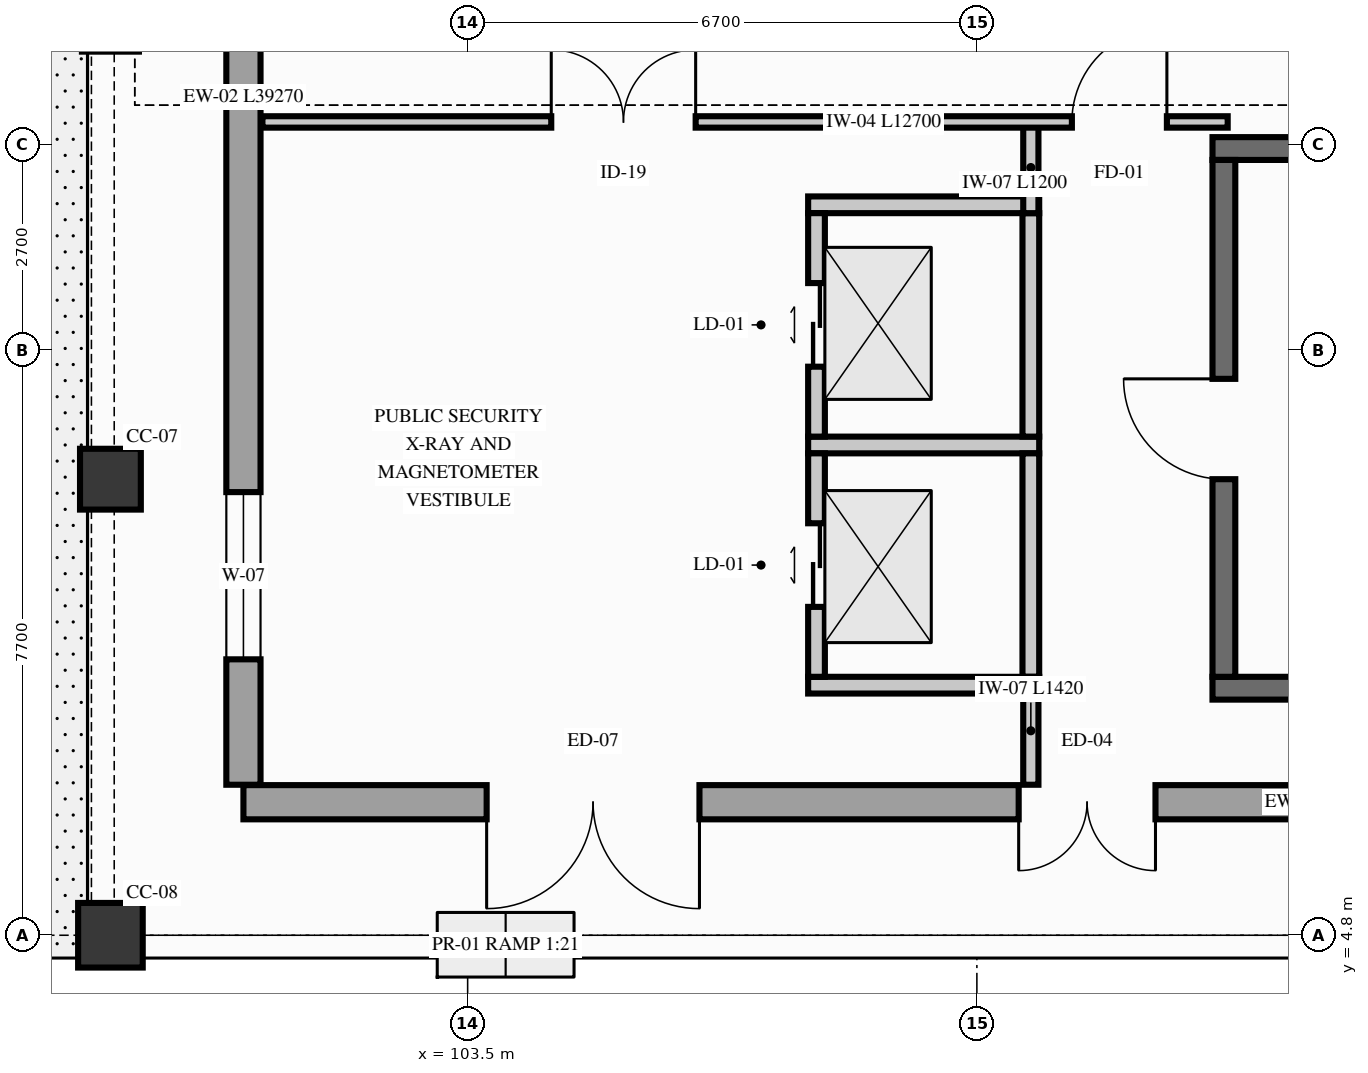
"""IFC4 building model, lengths in metres.
Left out: names, types, materials, properties, quantities, classifications, styles, units other than length and angle.
Written with IfcOpenShell. Run it as: python <this file> out.ifc"""

import sys

from ifc_helpers import new_model, si_unit, direction, frame, frame_2d, origin, origin_2d, place, context, subcontext, project, spatial, rectangle, extrude, element, fill, save


model = new_model("IFC4")
c1 = context("Model", 3, precision=1e-05, world=origin(), true_north=direction((0.0, 1.0)))
c2 = subcontext(c1, "Body", "Model", "MODEL_VIEW")
j1 = project(units=[si_unit("LENGTHUNIT", "METRE"), si_unit("PLANEANGLEUNIT", "RADIAN")], contexts=[c1])
p1 = place(None, origin())
s1 = spatial("IfcSite", under=j1, at=p1, CompositionType="ELEMENT")
p2 = place(p1, origin())
s2 = spatial("IfcBuilding", under=s1, at=p2, CompositionType="ELEMENT")
p3 = place(p2, origin())
s3 = spatial("IfcBuildingStorey", under=s2, at=p3, CompositionType="ELEMENT", Elevation=0.0)
for number, where, z_axis, x_axis in (
    (1, (113.3, 8.05, 0.0), (0.0, 0.0, 1.0), (1.0, 0.0, 0.0)),
    (2, (113.3, 15.15, 0.0), (0.0, 0.0, 1.0), (1.0, 0.0, 0.0)),
):
    element("IfcWall", number, at=place(p3, frame(where, z_axis=z_axis, x_axis=x_axis)), inside=s3, PredefinedType="SHEAR", context=c2, shape_type="SweptSolid", body=[
        extrude(rectangle(XDim=8.2, YDim=0.3, at=frame_2d((4.1, 0.0))), origin(), (0.0, 0.0, 1.0), 4.88),
    ])
p4 = place(p3, frame((113.45, 8.2, 0.0), z_axis=(0.0, 0.0, 1.0), x_axis=(0.0, 1.0, 0.0)))
e3 = element("IfcWall", 3, at=p4, inside=s3, PredefinedType="SHEAR", context=c2, shape_type="SweptSolid", body=[
    extrude(rectangle(XDim=6.8, YDim=0.3, at=frame_2d((3.4, 0.0))), origin(), (0.0, 0.0, 1.0), 4.88),
])
p5 = place(p4, frame((2.6, 0.0, 0.0)))
e4 = element("IfcOpeningElement", 4, at=p5, cuts=e3, PredefinedType="OPENING", context=c2, shape_type="SweptSolid", body=[
    extrude(rectangle(XDim=1.32, YDim=2.24, at=frame_2d((0.66, 1.12))), frame((0.0, 0.16, 0.0), z_axis=(0.0, -1.0, 0.0), x_axis=(1.0, 0.0, 0.0)), (0.0, 0.0, 1.0), 0.32),
])
p6 = place(p3, frame((98.8, 4.8, 0.0), z_axis=(0.0, 0.0, 1.0), x_axis=(1.0, 0.0, 0.0)))
e5 = element("IfcColumn", 5, at=p6, inside=s3, PredefinedType="COLUMN", context=c2, shape_type="SweptSolid", body=[
    extrude(rectangle(XDim=0.85, YDim=0.85, at=origin_2d()), origin(), (0.0, 0.0, 1.0), 5.1),
])
p7 = place(p3, frame((98.8, 10.8, 0.0), z_axis=(0.0, 0.0, 1.0), x_axis=(1.0, 0.0, 0.0)))
e6 = element("IfcColumn", 6, at=p7, inside=s3, PredefinedType="COLUMN", context=c2, shape_type="SweptSolid", body=[
    extrude(rectangle(XDim=0.8, YDim=0.8, at=origin_2d()), origin(), (0.0, 0.0, 1.0), 5.1),
])
p8 = place(p3, frame((100.55, 6.55, 0.0), z_axis=(0.0, 0.0, 1.0), x_axis=(1.0, 0.0, 0.0)))
e7 = element("IfcWall", 7, at=p8, inside=s3, PredefinedType="SOLIDWALL", context=c2, shape_type="SweptSolid", body=[
    extrude(rectangle(XDim=21.97, YDim=0.45, at=frame_2d((10.985, 0.0))), origin(), (0.0, 0.0, 1.0), 4.518),
])
p9 = place(p8, frame((6.0, 0.0, 0.0), z_axis=(0.0, 0.0, 1.0), x_axis=(-1.0, 0.0, 0.0)))
e8 = element("IfcOpeningElement", 8, at=p9, cuts=e7, PredefinedType="OPENING", context=c2, shape_type="SweptSolid", body=[
    extrude(rectangle(XDim=2.8, YDim=2.8, at=frame_2d((1.4, 1.4))), frame((0.0, 0.235, 0.0), z_axis=(0.0, -1.0, 0.0), x_axis=(1.0, 0.0, 0.0)), (0.0, 0.0, 1.0), 0.47),
])
p10 = place(p8, frame((12.0, 0.0, 0.0), z_axis=(0.0, 0.0, 1.0), x_axis=(-1.0, 0.0, 0.0)))
e9 = element("IfcOpeningElement", 9, at=p10, cuts=e7, PredefinedType="OPENING", context=c2, shape_type="SweptSolid", body=[
    extrude(rectangle(XDim=1.8, YDim=2.4, at=frame_2d((0.9, 1.2))), frame((0.0, 0.235, 0.0), z_axis=(0.0, -1.0, 0.0), x_axis=(1.0, 0.0, 0.0)), (0.0, 0.0, 1.0), 0.47),
])
p11 = place(p3, frame((100.55, 6.78, 0.0), z_axis=(0.0, 0.0, 1.0), x_axis=(0.0, 1.0, 0.0)))
e10 = element("IfcWall", 10, at=p11, inside=s3, PredefinedType="SOLIDWALL", context=c2, shape_type="SweptSolid", body=[
    extrude(rectangle(XDim=39.27, YDim=0.45, at=frame_2d((19.635, 0.0))), origin(), (0.0, 0.0, 1.0), 4.268),
])
p12 = place(p11, frame((17.5, 0.0, 0.0)))
e11 = element("IfcOpeningElement", 11, at=p12, cuts=e10, PredefinedType="OPENING", context=c2, shape_type="SweptSolid", body=[
    extrude(rectangle(XDim=2.4, YDim=2.7, at=frame_2d((1.2, 1.35))), frame((0.0, 0.235, 0.0), z_axis=(0.0, -1.0, 0.0), x_axis=(1.0, 0.0, 0.0)), (0.0, 0.0, 1.0), 0.47),
])
p13 = place(p11, frame((1.65, 0.0, 0.65)))
e12 = element("IfcOpeningElement", 12, at=p13, cuts=e10, PredefinedType="OPENING", context=c2, shape_type="SweptSolid", body=[
    extrude(rectangle(XDim=2.2, YDim=2.6, at=frame_2d((1.1, 1.3))), frame((0.0, 0.235, 0.0), z_axis=(0.0, -1.0, 0.0), x_axis=(1.0, 0.0, 0.0)), (0.0, 0.0, 1.0), 0.47),
])
p14 = place(p11, frame((14.25, 0.0, 0.65)))
e13 = element("IfcOpeningElement", 13, at=p14, cuts=e10, PredefinedType="OPENING", context=c2, shape_type="SweptSolid", body=[
    extrude(rectangle(XDim=2.0, YDim=2.5, at=frame_2d((1.0, 1.25))), frame((0.0, 0.235, 0.0), z_axis=(0.0, -1.0, 0.0), x_axis=(1.0, 0.0, 0.0)), (0.0, 0.0, 1.0), 0.47),
])
p15 = place(p11, frame((22.65, 0.0, 0.65)))
e14 = element("IfcOpeningElement", 14, at=p15, cuts=e10, PredefinedType="OPENING", context=c2, shape_type="SweptSolid", body=[
    extrude(rectangle(XDim=2.0, YDim=2.5, at=frame_2d((1.0, 1.25))), frame((0.0, 0.235, 0.0), z_axis=(0.0, -1.0, 0.0), x_axis=(1.0, 0.0, 0.0)), (0.0, 0.0, 1.0), 0.47),
])
p16 = place(p11, frame((26.85, 0.0, 0.65)))
e15 = element("IfcOpeningElement", 15, at=p16, cuts=e10, PredefinedType="OPENING", context=c2, shape_type="SweptSolid", body=[
    extrude(rectangle(XDim=2.2, YDim=2.6, at=frame_2d((1.1, 1.3))), frame((0.0, 0.235, 0.0), z_axis=(0.0, -1.0, 0.0), x_axis=(1.0, 0.0, 0.0)), (0.0, 0.0, 1.0), 0.47),
])
p17 = place(p11, frame((35.25, 0.0, 0.65)))
e16 = element("IfcOpeningElement", 16, at=p17, cuts=e10, PredefinedType="OPENING", context=c2, shape_type="SweptSolid", body=[
    extrude(rectangle(XDim=2.2, YDim=2.6, at=frame_2d((1.1, 1.3))), frame((0.0, 0.235, 0.0), z_axis=(0.0, -1.0, 0.0), x_axis=(1.0, 0.0, 0.0)), (0.0, 0.0, 1.0), 0.47),
])
for number, where, z_axis, x_axis in (
    (17, (107.98, 8.09, 0.0), (0.0, 0.0, 1.0), (1.0, 0.0, 0.0)),
    (18, (107.98, 11.25, 0.0), (0.0, 0.0, 1.0), (1.0, 0.0, 0.0)),
):
    element("IfcWall", number, at=place(p3, frame(where, z_axis=z_axis, x_axis=x_axis)), inside=s3, PredefinedType="PARTITIONING", context=c2, shape_type="SweptSolid", body=[
        extrude(rectangle(XDim=3.04, YDim=0.22, at=frame_2d((1.52, 0.0))), origin(), (0.0, 0.0, 1.0), 4.86),
    ])
p18 = place(p3, frame((108.09, 8.2, 0.0), z_axis=(0.0, 0.0, 1.0), x_axis=(0.0, 1.0, 0.0)))
e19 = element("IfcWall", 19, at=p18, inside=s3, PredefinedType="PARTITIONING", context=c2, shape_type="SweptSolid", body=[
    extrude(rectangle(XDim=2.94, YDim=0.22, at=frame_2d((1.47, 0.0))), origin(), (0.0, 0.0, 1.0), 4.86),
])
p19 = place(p18, frame((0.92, 0.0, 0.0)))
e20 = element("IfcOpeningElement", 20, at=p19, cuts=e19, PredefinedType="OPENING", context=c2, shape_type="SweptSolid", body=[
    extrude(rectangle(XDim=1.1, YDim=2.15, at=frame_2d((0.55, 1.075))), frame((0.0, 0.12, 0.0), z_axis=(0.0, -1.0, 0.0), x_axis=(1.0, 0.0, 0.0)), (0.0, 0.0, 1.0), 0.24),
])
p20 = place(p3, frame((110.91, 8.2, 0.0), z_axis=(0.0, 0.0, 1.0), x_axis=(0.0, 1.0, 0.0)))
e21 = element("IfcWall", 21, at=p20, inside=s3, PredefinedType="PARTITIONING", context=c2, shape_type="SweptSolid", body=[
    extrude(rectangle(XDim=2.94, YDim=0.22, at=frame_2d((1.47, 0.0))), origin(), (0.0, 0.0, 1.0), 4.86),
])
p21 = place(p3, frame((107.98, 14.41, 0.0), z_axis=(0.0, 0.0, 1.0), x_axis=(1.0, 0.0, 0.0)))
e22 = element("IfcWall", 22, at=p21, inside=s3, PredefinedType="PARTITIONING", context=c2, shape_type="SweptSolid", body=[
    extrude(rectangle(XDim=3.04, YDim=0.22, at=frame_2d((1.52, 0.0))), origin(), (0.0, 0.0, 1.0), 4.86),
])
p22 = place(p3, frame((108.09, 11.36, 0.0), z_axis=(0.0, 0.0, 1.0), x_axis=(0.0, 1.0, 0.0)))
e23 = element("IfcWall", 23, at=p22, inside=s3, PredefinedType="PARTITIONING", context=c2, shape_type="SweptSolid", body=[
    extrude(rectangle(XDim=2.94, YDim=0.22, at=frame_2d((1.47, 0.0))), origin(), (0.0, 0.0, 1.0), 4.86),
])
p23 = place(p22, frame((0.92, 0.0, 0.0)))
e24 = element("IfcOpeningElement", 24, at=p23, cuts=e23, PredefinedType="OPENING", context=c2, shape_type="SweptSolid", body=[
    extrude(rectangle(XDim=1.1, YDim=2.15, at=frame_2d((0.55, 1.075))), frame((0.0, 0.12, 0.0), z_axis=(0.0, -1.0, 0.0), x_axis=(1.0, 0.0, 0.0)), (0.0, 0.0, 1.0), 0.24),
])
p24 = place(p3, frame((110.91, 11.36, 0.0), z_axis=(0.0, 0.0, 1.0), x_axis=(0.0, 1.0, 0.0)))
e25 = element("IfcWall", 25, at=p24, inside=s3, PredefinedType="PARTITIONING", context=c2, shape_type="SweptSolid", body=[
    extrude(rectangle(XDim=2.94, YDim=0.22, at=frame_2d((1.47, 0.0))), origin(), (0.0, 0.0, 1.0), 4.86),
])
p25 = place(p3, frame((110.91, 6.78, 0.0), z_axis=(0.0, 0.0, 1.0), x_axis=(0.0, 1.0, 0.0)))
e26 = element("IfcWall", 26, at=p25, inside=s3, PredefinedType="PARTITIONING", context=c2, shape_type="SweptSolid", body=[
    extrude(rectangle(XDim=1.42, YDim=0.2, at=frame_2d((0.71, 0.0))), origin(), (0.0, 0.0, 1.0), 4.86),
])
p26 = place(p3, frame((110.91, 14.3, 0.0), z_axis=(0.0, 0.0, 1.0), x_axis=(0.0, 1.0, 0.0)))
e27 = element("IfcWall", 27, at=p26, inside=s3, PredefinedType="PARTITIONING", context=c2, shape_type="SweptSolid", body=[
    extrude(rectangle(XDim=1.2, YDim=0.2, at=frame_2d((0.6, 0.0))), origin(), (0.0, 0.0, 1.0), 4.86),
])
p27 = place(p3, frame((100.8, 15.5, 0.0), z_axis=(0.0, 0.0, 1.0), x_axis=(1.0, 0.0, 0.0)))
e28 = element("IfcWall", 28, at=p27, inside=s3, PredefinedType="PARTITIONING", context=c2, shape_type="SweptSolid", body=[
    extrude(rectangle(XDim=12.7, YDim=0.15, at=frame_2d((6.35, 0.0))), origin(), (0.0, 0.0, 1.0), 4.86),
])
p28 = place(p27, frame((3.8, 0.0, 0.0)))
e29 = element("IfcOpeningElement", 29, at=p28, cuts=e28, PredefinedType="OPENING", context=c2, shape_type="SweptSolid", body=[
    extrude(rectangle(XDim=1.9, YDim=2.4, at=frame_2d((0.95, 1.2))), frame((0.0, 0.085, 0.0), z_axis=(0.0, -1.0, 0.0), x_axis=(1.0, 0.0, 0.0)), (0.0, 0.0, 1.0), 0.17),
])
p29 = place(p27, frame((10.65, 0.0, 0.0)))
e30 = element("IfcOpeningElement", 30, at=p29, cuts=e28, PredefinedType="OPENING", context=c2, shape_type="SweptSolid", body=[
    extrude(rectangle(XDim=1.25, YDim=2.2, at=frame_2d((0.625, 1.1))), frame((0.0, 0.085, 0.0), z_axis=(0.0, -1.0, 0.0), x_axis=(1.0, 0.0, 0.0)), (0.0, 0.0, 1.0), 0.17),
])
p30 = place(p9, origin())
e31 = element("IfcDoor", 31, at=p30, inside=s3, OperationType="DOUBLE_DOOR_SINGLE_SWING", PredefinedType="DOOR", context=c2, shape_type="SweptSolid", body=[
    extrude(rectangle(XDim=2.8, YDim=2.8, at=frame_2d((1.4, 1.4))), frame((0.0, 0.025, 0.0), z_axis=(0.0, -1.0, 0.0), x_axis=(1.0, 0.0, 0.0)), (0.0, 0.0, 1.0), 0.05),
])
fill(e8, e31)
p31 = place(p10, origin())
e32 = element("IfcDoor", 32, at=p31, inside=s3, OperationType="DOUBLE_DOOR_SINGLE_SWING", PredefinedType="DOOR", context=c2, shape_type="SweptSolid", body=[
    extrude(rectangle(XDim=1.8, YDim=2.4, at=frame_2d((0.9, 1.2))), frame((0.0, 0.025, 0.0), z_axis=(0.0, -1.0, 0.0), x_axis=(1.0, 0.0, 0.0)), (0.0, 0.0, 1.0), 0.05),
])
fill(e9, e32)
p32 = place(p13, origin())
e33 = element("IfcWindow", 33, at=p32, inside=s3, PartitioningType="SINGLE_PANEL", PredefinedType="WINDOW", context=c2, shape_type="SweptSolid", body=[
    extrude(rectangle(XDim=2.2, YDim=2.6, at=frame_2d((1.1, 1.3))), frame((0.0, 0.03, 0.0), z_axis=(0.0, -1.0, 0.0), x_axis=(1.0, 0.0, 0.0)), (0.0, 0.0, 1.0), 0.06),
])
fill(e12, e33)
p33 = place(p5, origin())
e34 = element("IfcDoor", 34, at=p33, inside=s3, OperationType="SINGLE_SWING_RIGHT", PredefinedType="DOOR", context=c2, shape_type="SweptSolid", body=[
    extrude(rectangle(XDim=1.32, YDim=2.24, at=frame_2d((0.66, 1.12))), frame((0.0, 0.025, 0.0), z_axis=(0.0, -1.0, 0.0), x_axis=(1.0, 0.0, 0.0)), (0.0, 0.0, 1.0), 0.05),
])
fill(e4, e34)
p34 = place(p19, origin())
e35 = element("IfcDoor", 35, at=p34, inside=s3, OperationType="DOUBLE_DOOR_SLIDING", PredefinedType="DOOR", context=c2, shape_type="SweptSolid", body=[
    extrude(rectangle(XDim=1.1, YDim=2.15, at=frame_2d((0.55, 1.075))), frame((0.0, 0.025, 0.0), z_axis=(0.0, -1.0, 0.0), x_axis=(1.0, 0.0, 0.0)), (0.0, 0.0, 1.0), 0.05),
])
fill(e20, e35)
p35 = place(p23, origin())
e36 = element("IfcDoor", 36, at=p35, inside=s3, OperationType="DOUBLE_DOOR_SLIDING", PredefinedType="DOOR", context=c2, shape_type="SweptSolid", body=[
    extrude(rectangle(XDim=1.1, YDim=2.15, at=frame_2d((0.55, 1.075))), frame((0.0, 0.025, 0.0), z_axis=(0.0, -1.0, 0.0), x_axis=(1.0, 0.0, 0.0)), (0.0, 0.0, 1.0), 0.05),
])
fill(e24, e36)
p36 = place(p28, origin())
e37 = element("IfcDoor", 37, at=p36, inside=s3, OperationType="DOUBLE_DOOR_SINGLE_SWING", PredefinedType="DOOR", context=c2, shape_type="SweptSolid", body=[
    extrude(rectangle(XDim=1.9, YDim=2.4, at=frame_2d((0.95, 1.2))), frame((0.0, 0.025, 0.0), z_axis=(0.0, -1.0, 0.0), x_axis=(1.0, 0.0, 0.0)), (0.0, 0.0, 1.0), 0.05),
])
fill(e29, e37)
p37 = place(p29, origin())
e38 = element("IfcDoor", 38, at=p37, inside=s3, OperationType="SINGLE_SWING_RIGHT", PredefinedType="DOOR", context=c2, shape_type="SweptSolid", body=[
    extrude(rectangle(XDim=1.25, YDim=2.2, at=frame_2d((0.625, 1.1))), frame((0.0, 0.025, 0.0), z_axis=(0.0, -1.0, 0.0), x_axis=(1.0, 0.0, 0.0)), (0.0, 0.0, 1.0), 0.05),
])
fill(e30, e38)
save(model, sys.argv[1])
